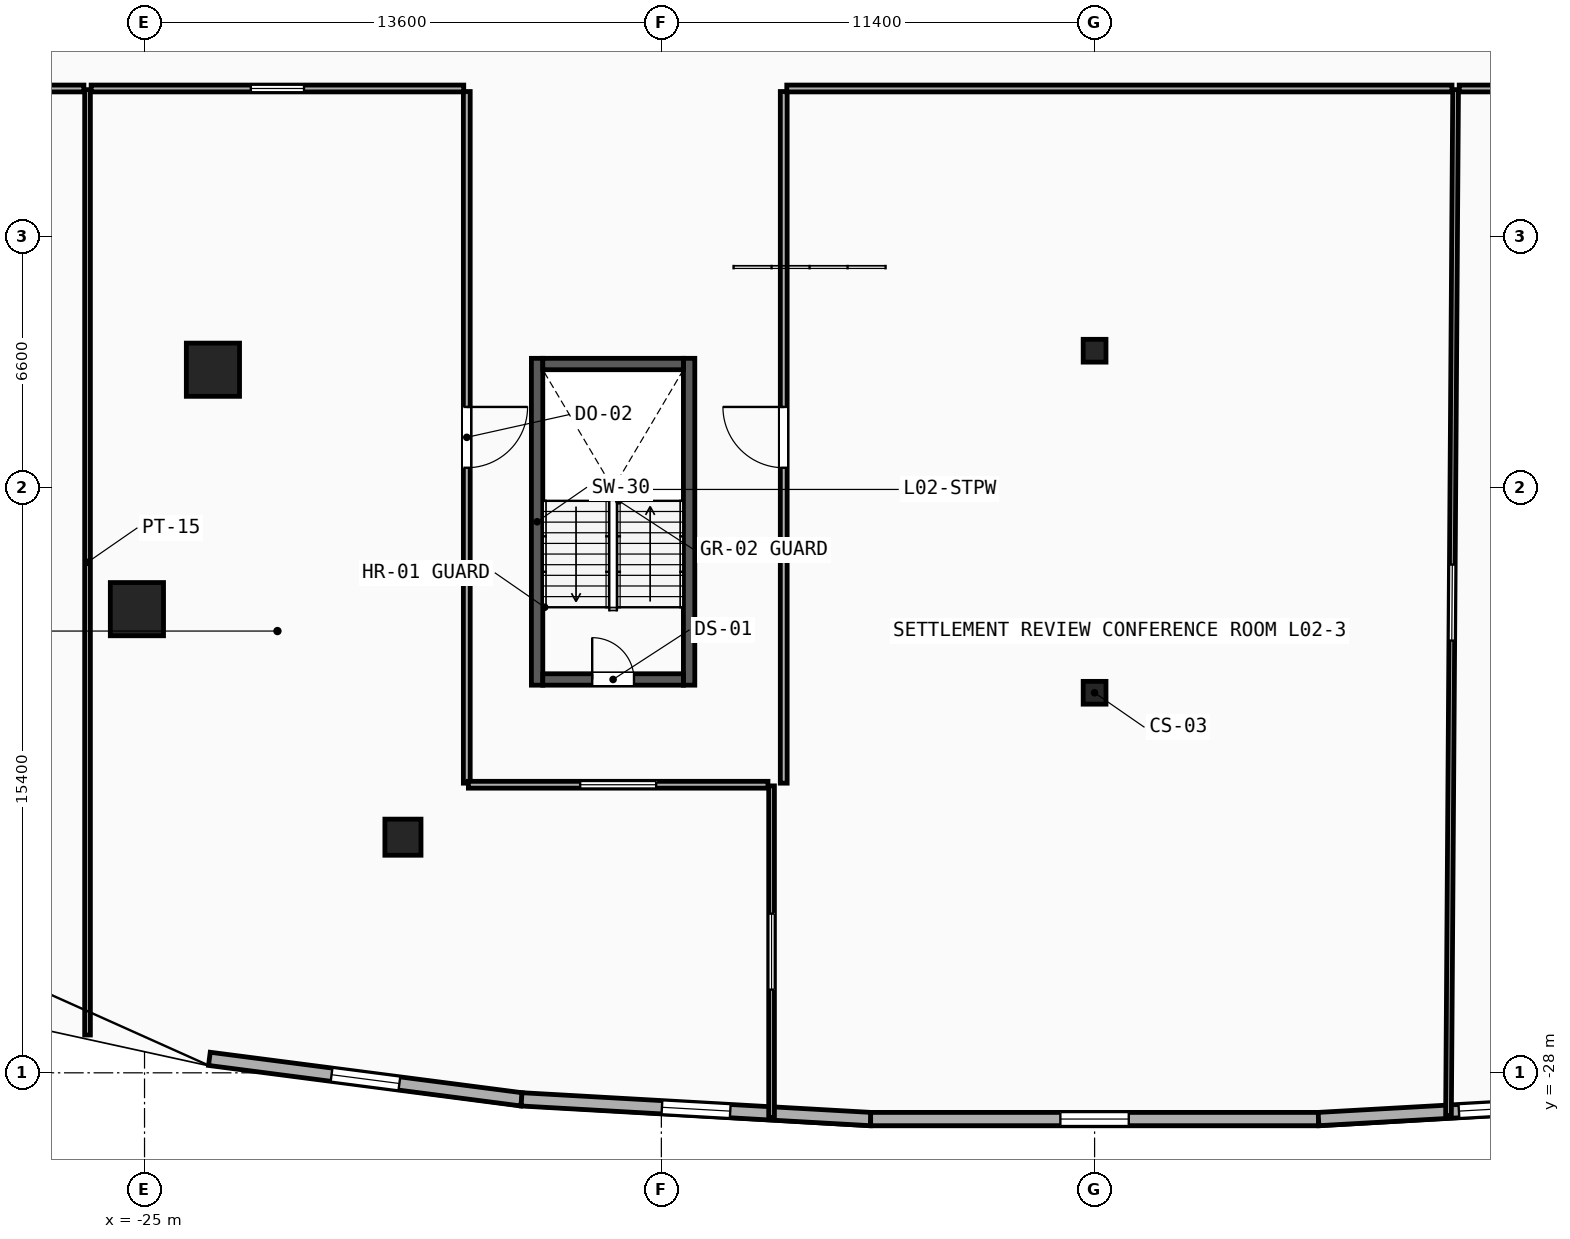
"""IFC4 building model, lengths in metres.
Left out: names, types, materials, properties, quantities, classifications, styles, units other than length and angle.
Written with IfcOpenShell. Run it as: python <this file> out.ifc"""

import sys

from ifc_helpers import new_model, si_unit, direction, frame, frame_2d, origin, origin_2d, place, context, subcontext, project, spatial, rectangle, hollow_rectangle, circle, extrude, element, fill, save


model = new_model("IFC4")
c1 = context("Model", 3, precision=1e-05, world=origin(), true_north=direction((0.0, 1.0)))
c2 = subcontext(c1, "Body", "Model", "MODEL_VIEW")
j1 = project(units=[si_unit("LENGTHUNIT", "METRE"), si_unit("PLANEANGLEUNIT", "RADIAN")], contexts=[c1])
p1 = place(None, origin())
s1 = spatial("IfcSite", under=j1, at=p1, CompositionType="ELEMENT")
p2 = place(p1, origin())
s2 = spatial("IfcBuilding", under=s1, at=p2, CompositionType="ELEMENT")
p3 = place(p2, frame((0.0, 0.0, 12.0)))
s3 = spatial("IfcBuildingStorey", under=s2, at=p3, CompositionType="ELEMENT", Elevation=12.0)
for number, where, z_axis, x_axis in (
    (1, (-23.2, -9.5, 0.0), (0.0, 0.0, 1.0), (1.0, 0.0, 0.0)),
    (2, (-25.2, -15.8, 0.0), (0.0, 0.0, 1.0), (1.0, 0.0, 0.0)),
):
    element("IfcColumn", number, at=place(p3, frame(where, z_axis=z_axis, x_axis=x_axis)), inside=s3, PredefinedType="COLUMN", context=c2, shape_type="SweptSolid", body=[
        extrude(rectangle(XDim=1.4, YDim=1.4, at=origin_2d()), origin(), (0.0, 0.0, 1.0), 4.0),
    ])
for number, where, z_axis, x_axis in (
    (3, (0.0, -18.0, 0.0), (0.0, 0.0, 1.0), (1.0, 0.0, 0.0)),
    (4, (0.0, -9.0, 0.0), (0.0, 0.0, 1.0), (1.0, 0.0, 0.0)),
):
    element("IfcColumn", number, at=place(p3, frame(where, z_axis=z_axis, x_axis=x_axis)), inside=s3, PredefinedType="COLUMN", context=c2, shape_type="SweptSolid", body=[
        extrude(hollow_rectangle(XDim=0.6, YDim=0.6, WallThickness=0.032, at=origin_2d()), origin(), (0.0, 0.0, 1.0), 4.0),
    ])
p4 = place(p3, frame((-18.2, -21.8, 0.0), z_axis=(0.0, 0.0, 1.0), x_axis=(1.0, 0.0, 0.0)))
e5 = element("IfcColumn", 5, at=p4, inside=s3, PredefinedType="PILASTER", context=c2, shape_type="SweptSolid", body=[
    extrude(circle(Radius=0.475, at=origin_2d()), origin(), (0.0, 0.0, 1.0), 4.0),
])
p5 = place(p3, frame((-23.293, -27.632, 0.0), z_axis=(0.0, 0.0, 1.0), x_axis=(0.99168663472, -0.128676410104, 0.0)))
e6 = element("IfcWall", 6, at=p5, inside=s3, PredefinedType="SOLIDWALL", context=c2, shape_type="SweptSolid", body=[
    extrude(rectangle(XDim=8.284, YDim=0.35, at=frame_2d((4.142, 0.0))), origin(), (0.0, 0.0, 1.0), 3.65),
])
p6 = place(p5, frame((3.242, 0.0, 0.85)))
e7 = element("IfcOpeningElement", 7, at=p6, cuts=e6, PredefinedType="OPENING", context=c2, shape_type="SweptSolid", body=[
    extrude(rectangle(XDim=1.8, YDim=2.4, at=frame_2d((0.9, 1.2))), frame((0.0, 0.185, 0.0), z_axis=(0.0, -1.0, 0.0), x_axis=(1.0, 0.0, 0.0)), (0.0, 0.0, 1.0), 0.37),
])
p7 = place(p3, frame((-15.079, -28.698, 0.0), z_axis=(0.0, 0.0, 1.0), x_axis=(0.998413463137, -0.056307695976, 0.0)))
e8 = element("IfcWall", 8, at=p7, inside=s3, PredefinedType="SOLIDWALL", context=c2, shape_type="SweptSolid", body=[
    extrude(rectangle(XDim=9.201, YDim=0.35, at=frame_2d((4.6, 0.0))), origin(), (0.0, 0.0, 1.0), 3.65),
])
p8 = place(p7, frame((3.7, 0.0, 0.85)))
e9 = element("IfcOpeningElement", 9, at=p8, cuts=e8, PredefinedType="OPENING", context=c2, shape_type="SweptSolid", body=[
    extrude(rectangle(XDim=1.8, YDim=2.4, at=frame_2d((0.9, 1.2))), frame((0.0, 0.185, 0.0), z_axis=(0.0, -1.0, 0.0), x_axis=(1.0, 0.0, 0.0)), (0.0, 0.0, 1.0), 0.37),
])
p9 = place(p3, frame((-5.893, -29.216, 0.0), z_axis=(0.0, 0.0, 1.0), x_axis=(1.0, 0.0, 0.0)))
e10 = element("IfcWall", 10, at=p9, inside=s3, PredefinedType="SOLIDWALL", context=c2, shape_type="SweptSolid", body=[
    extrude(rectangle(XDim=11.785, YDim=0.35, at=frame_2d((5.893, 0.0))), origin(), (0.0, 0.0, 1.0), 3.65),
])
p10 = place(p9, frame((4.992, 0.0, 0.85)))
e11 = element("IfcOpeningElement", 11, at=p10, cuts=e10, PredefinedType="OPENING", context=c2, shape_type="SweptSolid", body=[
    extrude(rectangle(XDim=1.8, YDim=2.4, at=frame_2d((0.9, 1.2))), frame((0.0, 0.185, 0.0), z_axis=(0.0, -1.0, 0.0), x_axis=(1.0, 0.0, 0.0)), (0.0, 0.0, 1.0), 0.37),
])
p11 = place(p3, frame((5.893, -29.216, 0.0), z_axis=(0.0, 0.0, 1.0), x_axis=(0.998413463137, 0.056307695976, 0.0)))
e12 = element("IfcWall", 12, at=p11, inside=s3, PredefinedType="SOLIDWALL", context=c2, shape_type="SweptSolid", body=[
    extrude(rectangle(XDim=9.201, YDim=0.35, at=frame_2d((4.6, 0.0))), origin(), (0.0, 0.0, 1.0), 3.65),
])
p12 = place(p11, frame((3.7, 0.0, 0.85)))
e13 = element("IfcOpeningElement", 13, at=p12, cuts=e12, PredefinedType="OPENING", context=c2, shape_type="SweptSolid", body=[
    extrude(rectangle(XDim=1.8, YDim=2.4, at=frame_2d((0.9, 1.2))), frame((0.0, 0.185, 0.0), z_axis=(0.0, -1.0, 0.0), x_axis=(1.0, 0.0, 0.0)), (0.0, 0.0, 1.0), 0.37),
])
for number, where, z_axis, x_axis in (
    (14, (-14.67, -17.8, 0.0), (0.0, 0.0, 1.0), (0.0, 1.0, 0.0)),
    (15, (-10.67, -17.8, 0.0), (0.0, 0.0, 1.0), (0.0, 1.0, 0.0)),
):
    element("IfcWall", number, at=place(p3, frame(where, z_axis=z_axis, x_axis=x_axis)), inside=s3, PredefinedType="SHEAR", context=c2, shape_type="SweptSolid", body=[
        extrude(rectangle(XDim=8.6, YDim=0.3, at=frame_2d((4.3, 0.0))), origin(), (0.0, 0.0, 1.0), 3.65),
    ])
p13 = place(p3, frame((-14.52, -17.65, 0.0), z_axis=(0.0, 0.0, 1.0), x_axis=(1.0, 0.0, 0.0)))
e16 = element("IfcWall", 16, at=p13, inside=s3, PredefinedType="SHEAR", context=c2, shape_type="SweptSolid", body=[
    extrude(rectangle(XDim=3.7, YDim=0.3, at=frame_2d((1.85, 0.0))), origin(), (0.0, 0.0, 1.0), 3.65),
])
p14 = place(p13, frame((1.3, 0.0, 0.0)))
e17 = element("IfcOpeningElement", 17, at=p14, cuts=e16, PredefinedType="OPENING", context=c2, shape_type="SweptSolid", body=[
    extrude(rectangle(XDim=1.1, YDim=2.15, at=frame_2d((0.55, 1.075))), frame((0.0, 0.16, 0.0), z_axis=(0.0, -1.0, 0.0), x_axis=(1.0, 0.0, 0.0)), (0.0, 0.0, 1.0), 0.32),
])
p15 = place(p3, frame((-14.52, -9.35, 0.0), z_axis=(0.0, 0.0, 1.0), x_axis=(1.0, 0.0, 0.0)))
e18 = element("IfcWall", 18, at=p15, inside=s3, PredefinedType="SHEAR", context=c2, shape_type="SweptSolid", body=[
    extrude(rectangle(XDim=3.7, YDim=0.3, at=frame_2d((1.85, 0.0))), origin(), (0.0, 0.0, 1.0), 3.65),
])
p16 = place(p3, frame((-26.5, -27.005, 0.0), z_axis=(0.0, 0.0, 1.0), x_axis=(0.0, 1.0, 0.0)))
e19 = element("IfcWall", 19, at=p16, inside=s3, PredefinedType="PARTITIONING", context=c2, shape_type="SweptSolid", body=[
    extrude(rectangle(XDim=24.875, YDim=0.15, at=frame_2d((12.438, 0.0))), origin(), (0.0, 0.0, 1.0), 3.65),
])
p17 = place(p3, frame((-8.5, -29.172, 0.0), z_axis=(0.0, 0.0, 1.0), x_axis=(0.0, 1.0, 0.0)))
e20 = element("IfcWall", 20, at=p17, inside=s3, PredefinedType="PARTITIONING", context=c2, shape_type="SweptSolid", body=[
    extrude(rectangle(XDim=8.722, YDim=0.15, at=frame_2d((4.361, 0.0))), origin(), (0.0, 0.0, 1.0), 3.65),
])
p18 = place(p17, frame((3.361, 0.0, 1.05)))
e21 = element("IfcOpeningElement", 21, at=p18, cuts=e20, PredefinedType="OPENING", context=c2, shape_type="SweptSolid", body=[
    extrude(rectangle(XDim=2.0, YDim=1.5, at=frame_2d((1.0, 0.75))), frame((0.0, 0.085, 0.0), z_axis=(0.0, -1.0, 0.0), x_axis=(1.0, 0.0, 0.0)), (0.0, 0.0, 1.0), 0.17),
])
p19 = place(p3, frame((9.313, -29.125, 0.0), z_axis=(0.0, 0.0, 1.0), x_axis=(0.006936552508, 0.99997594183, 0.0)))
e22 = element("IfcWall", 22, at=p19, inside=s3, PredefinedType="PARTITIONING", context=c2, shape_type="SweptSolid", body=[
    extrude(rectangle(XDim=26.996, YDim=0.15, at=frame_2d((13.498, 0.0))), origin(), (0.0, 0.0, 1.0), 3.65),
])
p20 = place(p19, frame((12.498, 0.0, 1.05)))
e23 = element("IfcOpeningElement", 23, at=p20, cuts=e22, PredefinedType="OPENING", context=c2, shape_type="SweptSolid", body=[
    extrude(rectangle(XDim=2.0, YDim=1.5, at=frame_2d((1.0, 0.75))), frame((0.0, 0.085, 0.0), z_axis=(0.0, -1.0, 0.0), x_axis=(1.0, 0.0, 0.0)), (0.0, 0.0, 1.0), 0.17),
])
p21 = place(p3, frame((9.595, -2.1, 0.0), z_axis=(0.0, 0.0, 1.0), x_axis=(1.0, 0.0, 0.0)))
e24 = element("IfcWall", 24, at=p21, inside=s3, PredefinedType="PARTITIONING", context=c2, shape_type="SweptSolid", body=[
    extrude(rectangle(XDim=7.445, YDim=0.18, at=frame_2d((3.723, 0.0))), origin(), (0.0, 0.0, 1.0), 2.877),
])
p22 = place(p21, frame((2.722, 0.0, 1.05)))
e25 = element("IfcOpeningElement", 25, at=p22, cuts=e24, PredefinedType="OPENING", context=c2, shape_type="SweptSolid", body=[
    extrude(rectangle(XDim=2.0, YDim=1.5, at=frame_2d((1.0, 0.75))), frame((0.0, 0.1, 0.0), z_axis=(0.0, -1.0, 0.0), x_axis=(1.0, 0.0, 0.0)), (0.0, 0.0, 1.0), 0.2),
])
p23 = place(p3, frame((-16.52, -2.18, 0.0), z_axis=(0.0, 0.0, 1.0), x_axis=(0.0, -1.0, 0.0)))
e26 = element("IfcWall", 26, at=p23, inside=s3, PredefinedType="PARTITIONING", context=c2, shape_type="SweptSolid", body=[
    extrude(rectangle(XDim=18.198, YDim=0.18, at=frame_2d((9.099, 0.0))), origin(), (0.0, 0.0, 1.0), 3.65),
])
p24 = place(p23, frame((8.299, 0.0, 0.0)))
e27 = element("IfcOpeningElement", 27, at=p24, cuts=e26, PredefinedType="OPENING", context=c2, shape_type="SweptSolid", body=[
    extrude(rectangle(XDim=1.6, YDim=2.2, at=frame_2d((0.8, 1.1))), frame((0.0, 0.1, 0.0), z_axis=(0.0, -1.0, 0.0), x_axis=(1.0, 0.0, 0.0)), (0.0, 0.0, 1.0), 0.2),
])
p25 = place(p3, frame((-26.405, -2.1, 0.0), z_axis=(0.0, 0.0, 1.0), x_axis=(1.0, 0.0, 0.0)))
e28 = element("IfcWall", 28, at=p25, inside=s3, PredefinedType="PARTITIONING", context=c2, shape_type="SweptSolid", body=[
    extrude(rectangle(XDim=9.805, YDim=0.18, at=frame_2d((4.902, 0.0))), origin(), (0.0, 0.0, 1.0), 3.65),
])
p26 = place(p25, frame((4.202, 0.0, 1.05)))
e29 = element("IfcOpeningElement", 29, at=p26, cuts=e28, PredefinedType="OPENING", context=c2, shape_type="SweptSolid", body=[
    extrude(rectangle(XDim=1.4, YDim=1.5, at=frame_2d((0.7, 0.75))), frame((0.0, 0.1, 0.0), z_axis=(0.0, -1.0, 0.0), x_axis=(1.0, 0.0, 0.0)), (0.0, 0.0, 1.0), 0.2),
])
p27 = place(p3, frame((-16.479, -20.42, 0.0), z_axis=(0.0, 0.0, 1.0), x_axis=(1.0, 0.0, 0.0)))
e30 = element("IfcWall", 30, at=p27, inside=s3, PredefinedType="PARTITIONING", context=c2, shape_type="SweptSolid", body=[
    extrude(rectangle(XDim=7.884, YDim=0.18, at=frame_2d((3.942, 0.0))), origin(), (0.0, 0.0, 1.0), 3.65),
])
p28 = place(p27, frame((2.942, 0.0, 1.05)))
e31 = element("IfcOpeningElement", 31, at=p28, cuts=e30, PredefinedType="OPENING", context=c2, shape_type="SweptSolid", body=[
    extrude(rectangle(XDim=2.0, YDim=1.5, at=frame_2d((1.0, 0.75))), frame((0.0, 0.1, 0.0), z_axis=(0.0, -1.0, 0.0), x_axis=(1.0, 0.0, 0.0)), (0.0, 0.0, 1.0), 0.2),
])
p29 = place(p3, frame((-8.18, -20.378, 0.0), z_axis=(0.0, 0.0, 1.0), x_axis=(0.0, 1.0, 0.0)))
e32 = element("IfcWall", 32, at=p29, inside=s3, PredefinedType="PARTITIONING", context=c2, shape_type="SweptSolid", body=[
    extrude(rectangle(XDim=18.198, YDim=0.18, at=frame_2d((9.099, 0.0))), origin(), (0.0, 0.0, 1.0), 3.65),
])
p30 = place(p29, frame((8.299, 0.0, 0.0)))
e33 = element("IfcOpeningElement", 33, at=p30, cuts=e32, PredefinedType="OPENING", context=c2, shape_type="SweptSolid", body=[
    extrude(rectangle(XDim=1.6, YDim=2.2, at=frame_2d((0.8, 1.1))), frame((0.0, 0.1, 0.0), z_axis=(0.0, -1.0, 0.0), x_axis=(1.0, 0.0, 0.0)), (0.0, 0.0, 1.0), 0.2),
])
p31 = place(p3, frame((-8.1, -2.1, 0.0), z_axis=(0.0, 0.0, 1.0), x_axis=(1.0, 0.0, 0.0)))
e34 = element("IfcWall", 34, at=p31, inside=s3, PredefinedType="PARTITIONING", context=c2, shape_type="SweptSolid", body=[
    extrude(rectangle(XDim=17.505, YDim=0.18, at=frame_2d((8.752, 0.0))), origin(), (0.0, 0.0, 1.0), 2.877),
])
p32 = place(p3, frame((-35.479, -2.1, 0.0), z_axis=(0.0, 0.0, 1.0), x_axis=(1.0, 0.0, 0.0)))
e35 = element("IfcWall", 35, at=p32, inside=s3, PredefinedType="PARTITIONING", context=c2, shape_type="SweptSolid", body=[
    extrude(rectangle(XDim=8.884, YDim=0.18, at=frame_2d((4.442, 0.0))), origin(), (0.0, 0.0, 1.0), 3.65),
])
p33 = place(p32, frame((3.642, 0.0, 0.0)))
e36 = element("IfcOpeningElement", 36, at=p33, cuts=e35, PredefinedType="OPENING", context=c2, shape_type="SweptSolid", body=[
    extrude(rectangle(XDim=1.6, YDim=2.2, at=frame_2d((0.8, 1.1))), frame((0.0, 0.1, 0.0), z_axis=(0.0, -1.0, 0.0), x_axis=(1.0, 0.0, 0.0)), (0.0, 0.0, 1.0), 0.2),
])
p34 = place(p6, origin())
e37 = element("IfcWindow", 37, at=p34, inside=s3, PartitioningType="SINGLE_PANEL", PredefinedType="WINDOW", context=c2, shape_type="SweptSolid", body=[
    extrude(rectangle(XDim=1.8, YDim=2.4, at=frame_2d((0.9, 1.2))), frame((0.0, 0.03, 0.0), z_axis=(0.0, -1.0, 0.0), x_axis=(1.0, 0.0, 0.0)), (0.0, 0.0, 1.0), 0.06),
])
fill(e7, e37)
p35 = place(p8, origin())
e38 = element("IfcWindow", 38, at=p35, inside=s3, PartitioningType="SINGLE_PANEL", PredefinedType="WINDOW", context=c2, shape_type="SweptSolid", body=[
    extrude(rectangle(XDim=1.8, YDim=2.4, at=frame_2d((0.9, 1.2))), frame((0.0, 0.03, 0.0), z_axis=(0.0, -1.0, 0.0), x_axis=(1.0, 0.0, 0.0)), (0.0, 0.0, 1.0), 0.06),
])
fill(e9, e38)
p36 = place(p10, origin())
e39 = element("IfcWindow", 39, at=p36, inside=s3, PartitioningType="SINGLE_PANEL", PredefinedType="WINDOW", context=c2, shape_type="SweptSolid", body=[
    extrude(rectangle(XDim=1.8, YDim=2.4, at=frame_2d((0.9, 1.2))), frame((0.0, 0.03, 0.0), z_axis=(0.0, -1.0, 0.0), x_axis=(1.0, 0.0, 0.0)), (0.0, 0.0, 1.0), 0.06),
])
fill(e11, e39)
p37 = place(p12, origin())
e40 = element("IfcWindow", 40, at=p37, inside=s3, PartitioningType="SINGLE_PANEL", PredefinedType="WINDOW", context=c2, shape_type="SweptSolid", body=[
    extrude(rectangle(XDim=1.8, YDim=2.4, at=frame_2d((0.9, 1.2))), frame((0.0, 0.03, 0.0), z_axis=(0.0, -1.0, 0.0), x_axis=(1.0, 0.0, 0.0)), (0.0, 0.0, 1.0), 0.06),
])
fill(e13, e40)
p38 = place(p14, origin())
e41 = element("IfcDoor", 41, at=p38, inside=s3, OperationType="SINGLE_SWING_LEFT", PredefinedType="DOOR", context=c2, shape_type="SweptSolid", body=[
    extrude(rectangle(XDim=1.1, YDim=2.15, at=frame_2d((0.55, 1.075))), frame((0.0, 0.025, 0.0), z_axis=(0.0, -1.0, 0.0), x_axis=(1.0, 0.0, 0.0)), (0.0, 0.0, 1.0), 0.05),
])
fill(e17, e41)
p39 = place(p24, origin())
e42 = element("IfcDoor", 42, at=p39, inside=s3, OperationType="SINGLE_SWING_LEFT", PredefinedType="DOOR", context=c2, shape_type="SweptSolid", body=[
    extrude(rectangle(XDim=1.6, YDim=2.2, at=frame_2d((0.8, 1.1))), frame((0.0, 0.025, 0.0), z_axis=(0.0, -1.0, 0.0), x_axis=(1.0, 0.0, 0.0)), (0.0, 0.0, 1.0), 0.05),
])
fill(e27, e42)
p40 = place(p30, origin())
e43 = element("IfcDoor", 43, at=p40, inside=s3, OperationType="SINGLE_SWING_RIGHT", PredefinedType="DOOR", context=c2, shape_type="SweptSolid", body=[
    extrude(rectangle(XDim=1.6, YDim=2.2, at=frame_2d((0.8, 1.1))), frame((0.0, 0.025, 0.0), z_axis=(0.0, -1.0, 0.0), x_axis=(1.0, 0.0, 0.0)), (0.0, 0.0, 1.0), 0.05),
])
fill(e33, e43)
p41 = place(p18, origin())
e44 = element("IfcWindow", 44, at=p41, inside=s3, PartitioningType="SINGLE_PANEL", PredefinedType="WINDOW", context=c2, shape_type="SweptSolid", body=[
    extrude(rectangle(XDim=2.0, YDim=1.5, at=frame_2d((1.0, 0.75))), frame((0.0, 0.03, 0.0), z_axis=(0.0, -1.0, 0.0), x_axis=(1.0, 0.0, 0.0)), (0.0, 0.0, 1.0), 0.06),
])
fill(e21, e44)
p42 = place(p20, origin())
e45 = element("IfcWindow", 45, at=p42, inside=s3, PartitioningType="SINGLE_PANEL", PredefinedType="WINDOW", context=c2, shape_type="SweptSolid", body=[
    extrude(rectangle(XDim=2.0, YDim=1.5, at=frame_2d((1.0, 0.75))), frame((0.0, 0.03, 0.0), z_axis=(0.0, -1.0, 0.0), x_axis=(1.0, 0.0, 0.0)), (0.0, 0.0, 1.0), 0.06),
])
fill(e23, e45)
p43 = place(p26, origin())
e46 = element("IfcWindow", 46, at=p43, inside=s3, PartitioningType="SINGLE_PANEL", PredefinedType="WINDOW", context=c2, shape_type="SweptSolid", body=[
    extrude(rectangle(XDim=1.4, YDim=1.5, at=frame_2d((0.7, 0.75))), frame((0.0, 0.03, 0.0), z_axis=(0.0, -1.0, 0.0), x_axis=(1.0, 0.0, 0.0)), (0.0, 0.0, 1.0), 0.06),
])
fill(e29, e46)
p44 = place(p28, origin())
e47 = element("IfcWindow", 47, at=p44, inside=s3, PartitioningType="SINGLE_PANEL", PredefinedType="WINDOW", context=c2, shape_type="SweptSolid", body=[
    extrude(rectangle(XDim=2.0, YDim=1.5, at=frame_2d((1.0, 0.75))), frame((0.0, 0.03, 0.0), z_axis=(0.0, -1.0, 0.0), x_axis=(1.0, 0.0, 0.0)), (0.0, 0.0, 1.0), 0.06),
])
fill(e31, e47)
save(model, sys.argv[1])
